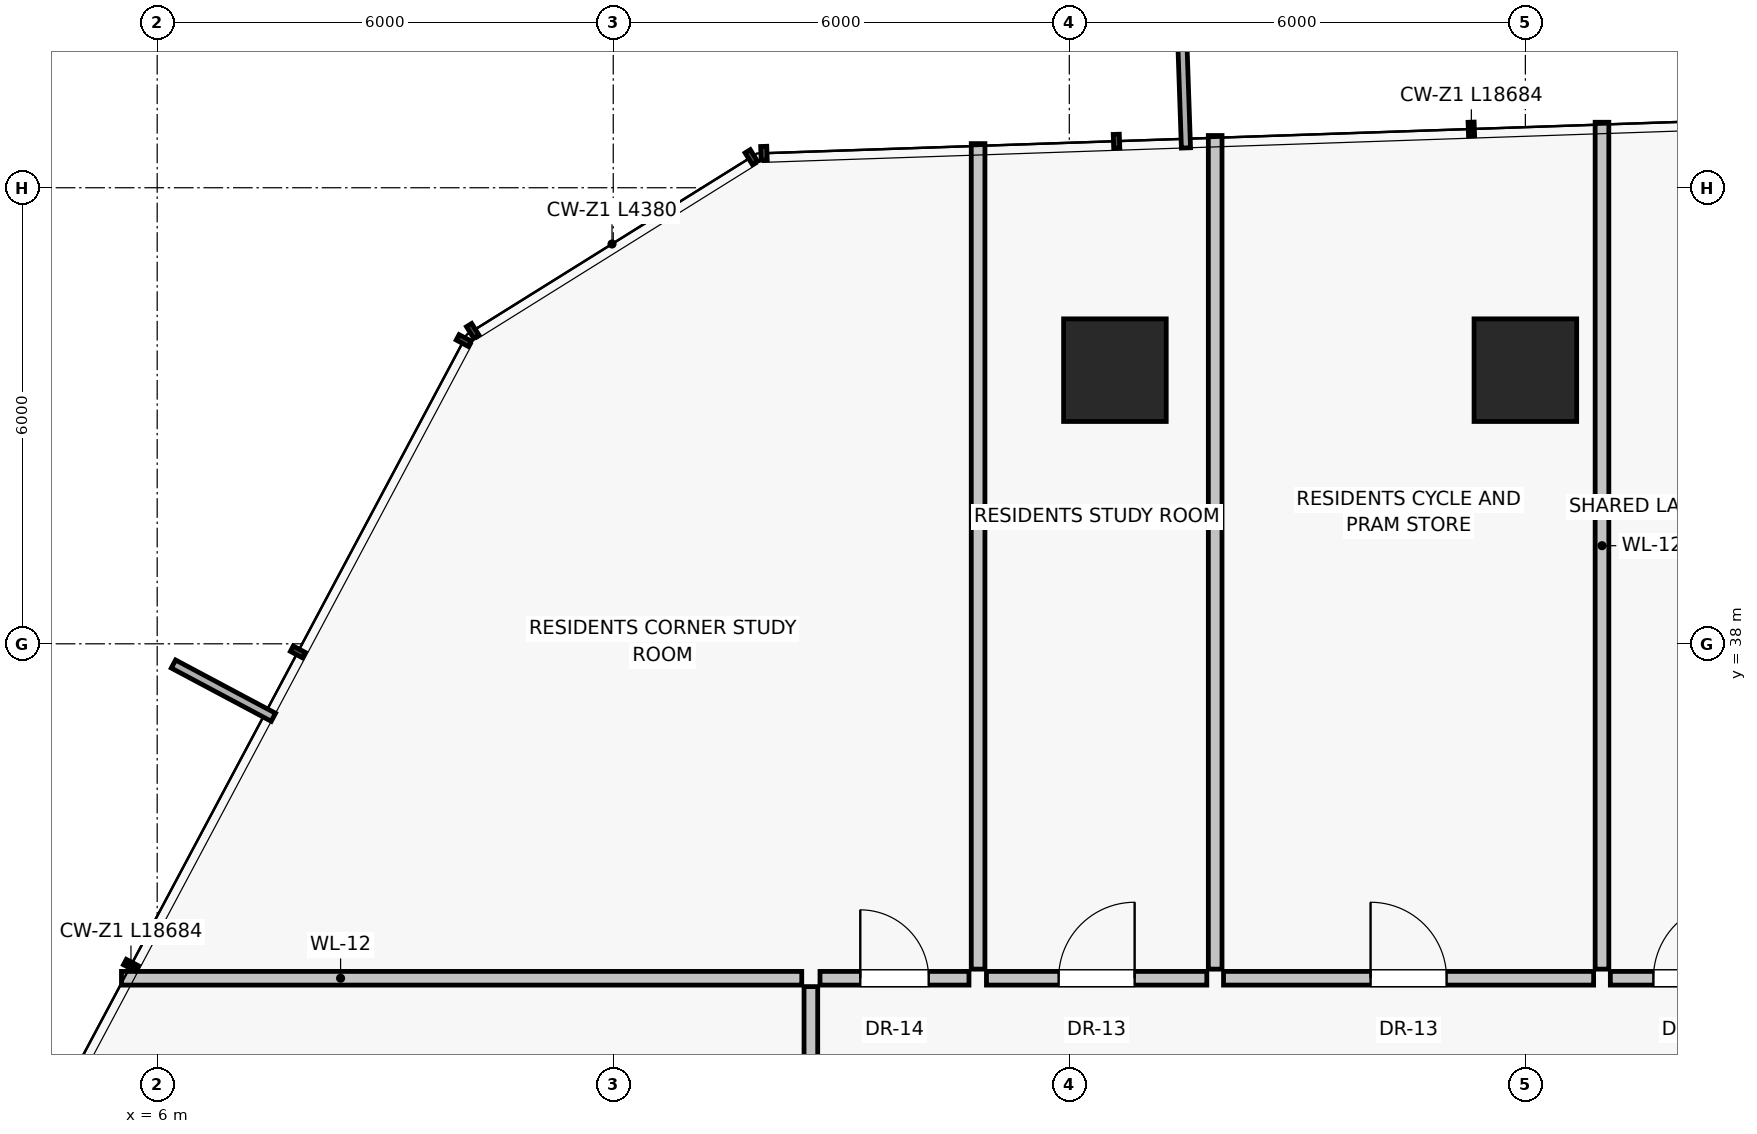
"""IFC4 building model, lengths in metres.
Left out: names, types, materials, properties, quantities, classifications, styles, units other than length and angle.
Written with IfcOpenShell. Run it as: python <this file> out.ifc"""

import sys

from ifc_helpers import new_model, si_unit, direction, frame, frame_2d, origin, origin_2d, place, context, subcontext, project, spatial, rectangle, extrude, source, transform, mapped, element, fill, save


model = new_model("IFC4")
c1 = context("Model", 3, precision=1e-05, world=origin(), true_north=direction((0.0, 1.0)))
c2 = subcontext(c1, "Body", "Model", "MODEL_VIEW")
j1 = project(units=[si_unit("LENGTHUNIT", "METRE"), si_unit("PLANEANGLEUNIT", "RADIAN")], contexts=[c1])
p1 = place(None, origin())
s1 = spatial("IfcSite", under=j1, at=p1, CompositionType="ELEMENT")
p2 = place(p1, origin())
s2 = spatial("IfcBuilding", under=s1, at=p2, CompositionType="ELEMENT")
p3 = place(p2, frame((0.0, 0.0, 30.55)))
s3 = spatial("IfcBuildingStorey", under=s2, at=p3, CompositionType="ELEMENT", Elevation=30.55)
for number, where, z_axis, x_axis in (
    (1, (24.0, 41.6, 0.0), (0.0, 0.0, 1.0), (1.0, 0.0, 0.0)),
    (2, (18.6, 41.6, 0.0), (0.0, 0.0, 1.0), (1.0, 0.0, 0.0)),
):
    element("IfcColumn", number, at=place(p3, frame(where, z_axis=z_axis, x_axis=x_axis)), inside=s3, PredefinedType="COLUMN", context=c2, shape_type="SweptSolid", body=[
        extrude(rectangle(XDim=1.35, YDim=1.35, at=origin_2d()), origin(), (0.0, 0.0, 1.0), 3.25),
    ])
p4 = place(p3, frame((16.8, 33.72, 0.0), z_axis=(0.0, 0.0, 1.0), x_axis=(0.0, 1.0, 0.0)))
e3 = element("IfcWall", 3, at=p4, inside=s3, PredefinedType="PARTITIONING", context=c2, shape_type="SweptSolid", body=[
    extrude(rectangle(XDim=10.86, YDim=0.18, at=frame_2d((5.43, 0.0))), origin(), (0.0, 0.0, 1.0), 3.0),
])
p5 = place(p3, frame((16.91, 33.6, 0.0), z_axis=(0.0, 0.0, 1.0), x_axis=(1.0, 0.0, 0.0)))
e4 = element("IfcWall", 4, at=p5, inside=s3, PredefinedType="PARTITIONING", context=c2, shape_type="SweptSolid", body=[
    extrude(rectangle(XDim=2.899, YDim=0.18, at=frame_2d((1.45, 0.0))), origin(), (0.0, 0.0, 1.0), 3.0),
])
p6 = place(p5, frame((0.949, 0.0, 0.0)))
e5 = element("IfcOpeningElement", 5, at=p6, cuts=e4, PredefinedType="OPENING", context=c2, shape_type="SweptSolid", body=[
    extrude(rectangle(XDim=1.0, YDim=2.01, at=frame_2d((0.5, 1.005))), frame((0.0, 0.1, 0.0), z_axis=(0.0, -1.0, 0.0), x_axis=(1.0, 0.0, 0.0)), (0.0, 0.0, 1.0), 0.2),
])
p7 = place(p3, frame((20.029, 33.6, 0.0), z_axis=(0.0, 0.0, 1.0), x_axis=(1.0, 0.0, 0.0)))
e6 = element("IfcWall", 6, at=p7, inside=s3, PredefinedType="PARTITIONING", context=c2, shape_type="SweptSolid", body=[
    extrude(rectangle(XDim=4.869, YDim=0.18, at=frame_2d((2.435, 0.0))), origin(), (0.0, 0.0, 1.0), 3.0),
])
p8 = place(p7, frame((1.935, 0.0, 0.0)))
e7 = element("IfcOpeningElement", 7, at=p8, cuts=e6, PredefinedType="OPENING", context=c2, shape_type="SweptSolid", body=[
    extrude(rectangle(XDim=1.0, YDim=2.01, at=frame_2d((0.5, 1.005))), frame((0.0, 0.1, 0.0), z_axis=(0.0, -1.0, 0.0), x_axis=(1.0, 0.0, 0.0)), (0.0, 0.0, 1.0), 0.2),
])
p9 = place(p3, frame((19.919, 33.72, 0.0), z_axis=(0.0, 0.0, 1.0), x_axis=(0.0, 1.0, 0.0)))
e8 = element("IfcWall", 8, at=p9, inside=s3, PredefinedType="PARTITIONING", context=c2, shape_type="SweptSolid", body=[
    extrude(rectangle(XDim=10.967, YDim=0.18, at=frame_2d((5.483, 0.0))), origin(), (0.0, 0.0, 1.0), 3.0),
])
p10 = place(p3, frame((25.008, 33.72, 0.0), z_axis=(0.0, 0.0, 1.0), x_axis=(0.0, 1.0, 0.0)))
e9 = element("IfcWall", 9, at=p10, inside=s3, PredefinedType="PARTITIONING", context=c2, shape_type="SweptSolid", body=[
    extrude(rectangle(XDim=11.141, YDim=0.18, at=frame_2d((5.571, 0.0))), origin(), (0.0, 0.0, 1.0), 3.0),
])
p11 = place(p3, frame((25.118, 33.6, 0.0), z_axis=(0.0, 0.0, 1.0), x_axis=(1.0, 0.0, 0.0)))
e10 = element("IfcWall", 10, at=p11, inside=s3, PredefinedType="PARTITIONING", context=c2, shape_type="SweptSolid", body=[
    extrude(rectangle(XDim=2.133, YDim=0.18, at=frame_2d((1.066, 0.0))), origin(), (0.0, 0.0, 1.0), 3.0),
])
p12 = place(p11, frame((0.566, 0.0, 0.0)))
e11 = element("IfcOpeningElement", 11, at=p12, cuts=e10, PredefinedType="OPENING", context=c2, shape_type="SweptSolid", body=[
    extrude(rectangle(XDim=1.0, YDim=2.01, at=frame_2d((0.5, 1.005))), frame((0.0, 0.1, 0.0), z_axis=(0.0, -1.0, 0.0), x_axis=(1.0, 0.0, 0.0)), (0.0, 0.0, 1.0), 0.2),
])
p13 = place(p3, frame((14.48, 33.6, 0.0), z_axis=(0.0, 0.0, 1.0), x_axis=(-1.0, 0.0, 0.0)))
e12 = element("IfcWall", 12, at=p13, inside=s3, PredefinedType="PARTITIONING", context=c2, shape_type="SweptSolid", body=[
    extrude(rectangle(XDim=8.95, YDim=0.18, at=frame_2d((4.475, 0.0))), origin(), (0.0, 0.0, 1.0), 3.0),
])
p14 = place(p3, frame((14.6, 29.139, 0.0), z_axis=(0.0, 0.0, 1.0), x_axis=(0.0, 1.0, 0.0)))
e13 = element("IfcWall", 13, at=p14, inside=s3, PredefinedType="PARTITIONING", context=c2, shape_type="SweptSolid", body=[
    extrude(rectangle(XDim=4.351, YDim=0.18, at=frame_2d((2.176, 0.0))), origin(), (0.0, 0.0, 1.0), 3.0),
])
p15 = place(p14, frame((1.676, 0.0, 0.0)))
e14 = element("IfcOpeningElement", 14, at=p15, cuts=e13, PredefinedType="OPENING", context=c2, shape_type="SweptSolid", body=[
    extrude(rectangle(XDim=1.0, YDim=2.01, at=frame_2d((0.5, 1.005))), frame((0.0, 0.1, 0.0), z_axis=(0.0, -1.0, 0.0), x_axis=(1.0, 0.0, 0.0)), (0.0, 0.0, 1.0), 0.2),
])
p16 = place(p3, frame((14.72, 33.6, 0.0), z_axis=(0.0, 0.0, 1.0), x_axis=(1.0, 0.0, 0.0)))
e15 = element("IfcWall", 15, at=p16, inside=s3, PredefinedType="PARTITIONING", context=c2, shape_type="SweptSolid", body=[
    extrude(rectangle(XDim=1.96, YDim=0.18, at=frame_2d((0.98, 0.0))), origin(), (0.0, 0.0, 1.0), 3.0),
])
p17 = place(p16, frame((0.53, 0.0, 0.0)))
e16 = element("IfcOpeningElement", 16, at=p17, cuts=e15, PredefinedType="OPENING", context=c2, shape_type="SweptSolid", body=[
    extrude(rectangle(XDim=0.9, YDim=2.01, at=frame_2d((0.45, 1.005))), frame((0.0, 0.1, 0.0), z_axis=(0.0, -1.0, 0.0), x_axis=(1.0, 0.0, 0.0)), (0.0, 0.0, 1.0), 0.2),
])
m1 = source(origin(), c2, "Body", "SweptSolid", [
    extrude(rectangle(XDim=1.0, YDim=2.01, at=frame_2d((0.5, 1.005))), frame((0.0, 0.025, 0.0), z_axis=(0.0, -1.0, 0.0), x_axis=(1.0, 0.0, 0.0)), (0.0, 0.0, 1.0), 0.05),
])
p18 = place(p6, origin())
e17 = element("IfcDoor", 17, at=p18, inside=s3, OperationType="SINGLE_SWING_RIGHT", PredefinedType="DOOR", context=c2, shape_type="MappedRepresentation", body=[
    mapped(m1, transform((0.0, 0.0, 0.0), scale=1.0)),
])
fill(e5, e17)
p19 = place(p8, origin())
e18 = element("IfcDoor", 18, at=p19, inside=s3, OperationType="SINGLE_SWING_LEFT", PredefinedType="DOOR", context=c2, shape_type="MappedRepresentation", body=[
    mapped(m1, transform((0.0, 0.0, 0.0), scale=1.0)),
])
fill(e7, e18)
p20 = place(p12, origin())
e19 = element("IfcDoor", 19, at=p20, inside=s3, OperationType="SINGLE_SWING_RIGHT", PredefinedType="DOOR", context=c2, shape_type="MappedRepresentation", body=[
    mapped(m1, transform((0.0, 0.0, 0.0), scale=1.0)),
])
fill(e11, e19)
m2 = source(origin(), c2, "Body", "SweptSolid", [
    extrude(rectangle(XDim=0.9, YDim=2.01, at=frame_2d((0.45, 1.005))), frame((0.0, 0.025, 0.0), z_axis=(0.0, -1.0, 0.0), x_axis=(1.0, 0.0, 0.0)), (0.0, 0.0, 1.0), 0.05),
])
p21 = place(p17, origin())
e20 = element("IfcDoor", 20, at=p21, inside=s3, OperationType="SINGLE_SWING_LEFT", PredefinedType="DOOR", context=c2, shape_type="MappedRepresentation", body=[
    mapped(m2, transform((0.0, 0.0, 0.0), scale=1.0)),
])
fill(e16, e20)
save(model, sys.argv[1])
